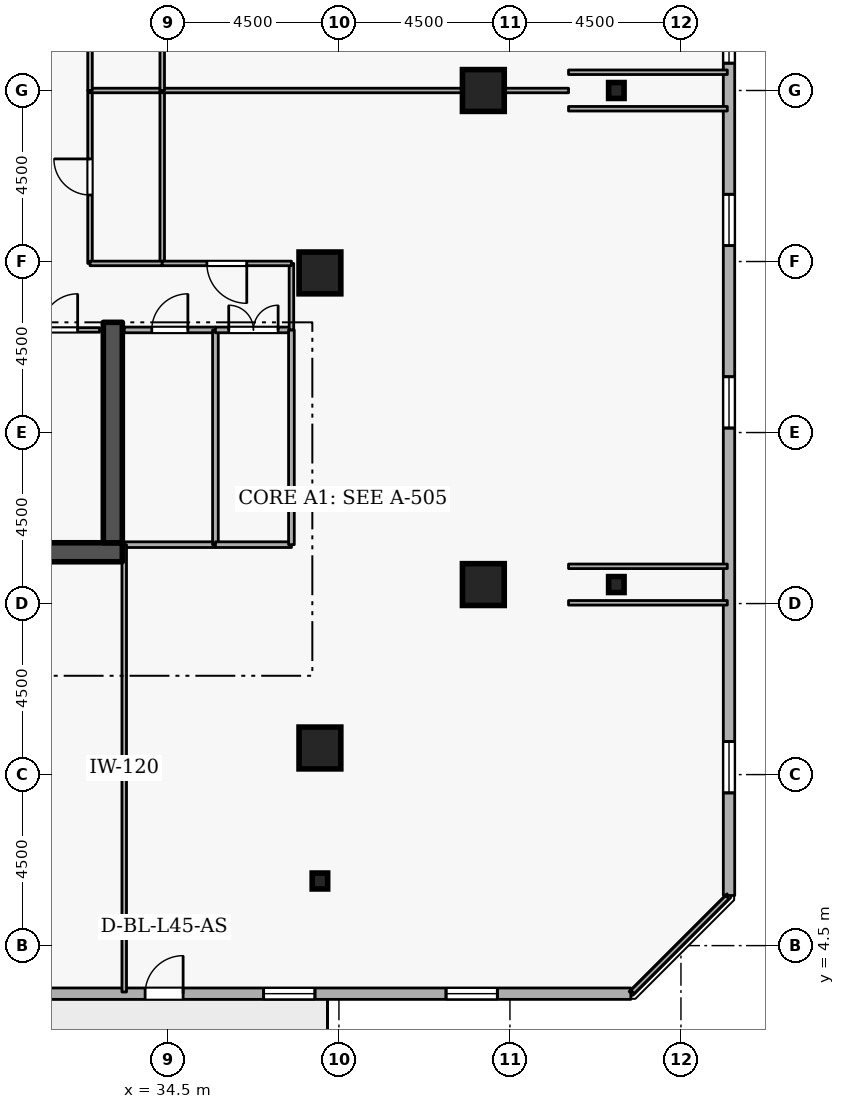
"""IFC4 building model, lengths in metres.
Left out: names, types, materials, properties, quantities, classifications, styles, units other than length and angle.
Written with IfcOpenShell. Run it as: python <this file> out.ifc"""

import sys

from ifc_helpers import new_model, si_unit, direction, frame, frame_2d, origin, origin_2d, place, context, subcontext, project, spatial, rectangle, i_section, extrude, element, fill, save


model = new_model("IFC4")
c1 = context("Model", 3, precision=1e-05, world=origin(), true_north=direction((0.0, 1.0)))
c2 = subcontext(c1, "Body", "Model", "MODEL_VIEW")
j1 = project(units=[si_unit("LENGTHUNIT", "METRE"), si_unit("PLANEANGLEUNIT", "RADIAN")], contexts=[c1])
p1 = place(None, origin())
s1 = spatial("IfcSite", under=j1, at=p1, CompositionType="ELEMENT")
p2 = place(p1, origin())
s2 = spatial("IfcBuilding", under=s1, at=p2, CompositionType="ELEMENT")
p3 = place(p2, frame((0.0, 0.0, 170.7)))
s3 = spatial("IfcBuildingStorey", under=s2, at=p3, CompositionType="ELEMENT", Elevation=170.7)
p4 = place(p3, frame((17.7, 14.85, 0.0), z_axis=(0.0, 0.0, 1.0), x_axis=(1.0, 0.0, 0.0)))
e1 = element("IfcWall", 1, at=p4, inside=s3, PredefinedType="SHEAR", context=c2, shape_type="SweptSolid", body=[
    extrude(rectangle(XDim=15.6, YDim=0.5, at=frame_2d((7.8, 0.0))), origin(), (0.0, 0.0, 1.0), 3.6),
])
p5 = place(p3, frame((33.05, 15.1, 0.0), z_axis=(0.0, 0.0, 1.0), x_axis=(0.0, 1.0, 0.0)))
e2 = element("IfcWall", 2, at=p5, inside=s3, PredefinedType="SHEAR", context=c2, shape_type="SweptSolid", body=[
    extrude(rectangle(XDim=5.8, YDim=0.5, at=frame_2d((2.9, 0.0))), origin(), (0.0, 0.0, 1.0), 3.6),
])
for number, where, z_axis, x_axis in (
    (3, (38.5, 9.7, 0.0), (0.0, 0.0, 1.0), (1.0, 0.0, 0.0)),
    (4, (42.8, 14.0, 0.0), (0.0, 0.0, 1.0), (1.0, 0.0, 0.0)),
    (5, (42.8, 27.0, 0.0), (0.0, 0.0, 1.0), (1.0, 0.0, 0.0)),
    (6, (38.5, 22.2, 0.0), (0.0, 0.0, 1.0), (1.0, 0.0, 0.0)),
):
    element("IfcColumn", number, at=place(p3, frame(where, z_axis=z_axis, x_axis=x_axis)), inside=s3, PredefinedType="COLUMN", context=c2, shape_type="SweptSolid", body=[
        extrude(rectangle(XDim=1.1, YDim=1.1, at=origin_2d()), origin(), (0.0, 0.0, 1.0), 3.6),
    ])
for number, where, z_axis, x_axis in (
    (7, (38.5, 6.2, 0.0), (0.0, 0.0, 1.0), (1.0, 0.0, 0.0)),
    (8, (46.3, 14.0, 0.0), (0.0, 0.0, 1.0), (1.0, 0.0, 0.0)),
    (9, (46.3, 27.0, 0.0), (0.0, 0.0, 1.0), (1.0, 0.0, 0.0)),
):
    element("IfcColumn", number, at=place(p3, frame(where, z_axis=z_axis, x_axis=x_axis)), inside=s3, PredefinedType="COLUMN", context=c2, shape_type="SweptSolid", body=[
        extrude(i_section(OverallWidth=0.407, OverallDepth=0.419, WebThickness=0.031, FlangeThickness=0.049, FilletRadius=0.015, at=origin_2d()), origin(), (0.0, 0.0, 1.0), 3.6),
    ])
p6 = place(p3, frame((10.319, 3.235, 0.0), z_axis=(0.0, 0.0, 1.0), x_axis=(1.0, 0.0, 0.0)))
e10 = element("IfcWall", 10, at=p6, inside=s3, PredefinedType="STANDARD", context=c2, shape_type="SweptSolid", body=[
    extrude(rectangle(XDim=36.363, YDim=0.3, at=frame_2d((18.181, 0.0))), origin(), (0.0, 0.0, 1.0), 2.22),
])
p7 = place(p6, frame((23.581, 0.0, 0.0)))
e11 = element("IfcOpeningElement", 11, at=p7, cuts=e10, PredefinedType="OPENING", context=c2, shape_type="SweptSolid", body=[
    extrude(rectangle(XDim=1.0, YDim=2.08, at=frame_2d((0.5, 1.04))), frame((0.0, 0.16, 0.0), z_axis=(0.0, -1.0, 0.0), x_axis=(1.0, 0.0, 0.0)), (0.0, 0.0, 1.0), 0.32),
])
p8 = place(p6, frame((2.7, 0.0, 0.72)))
e12 = element("IfcOpeningElement", 12, at=p8, cuts=e10, PredefinedType="OPENING", context=c2, shape_type="SweptSolid", body=[
    extrude(rectangle(XDim=1.35, YDim=1.05, at=frame_2d((0.675, 0.525))), frame((0.0, 0.16, 0.0), z_axis=(0.0, -1.0, 0.0), x_axis=(1.0, 0.0, 0.0)), (0.0, 0.0, 1.0), 0.32),
])
p9 = place(p6, frame((7.5, 0.0, 0.72)))
e13 = element("IfcOpeningElement", 13, at=p9, cuts=e10, PredefinedType="OPENING", context=c2, shape_type="SweptSolid", body=[
    extrude(rectangle(XDim=1.35, YDim=1.05, at=frame_2d((0.675, 0.525))), frame((0.0, 0.16, 0.0), z_axis=(0.0, -1.0, 0.0), x_axis=(1.0, 0.0, 0.0)), (0.0, 0.0, 1.0), 0.32),
])
p10 = place(p6, frame((12.3, 0.0, 0.72)))
e14 = element("IfcOpeningElement", 14, at=p10, cuts=e10, PredefinedType="OPENING", context=c2, shape_type="SweptSolid", body=[
    extrude(rectangle(XDim=1.35, YDim=1.05, at=frame_2d((0.675, 0.525))), frame((0.0, 0.16, 0.0), z_axis=(0.0, -1.0, 0.0), x_axis=(1.0, 0.0, 0.0)), (0.0, 0.0, 1.0), 0.32),
])
p11 = place(p6, frame((17.1, 0.0, 0.72)))
e15 = element("IfcOpeningElement", 15, at=p11, cuts=e10, PredefinedType="OPENING", context=c2, shape_type="SweptSolid", body=[
    extrude(rectangle(XDim=1.35, YDim=1.05, at=frame_2d((0.675, 0.525))), frame((0.0, 0.16, 0.0), z_axis=(0.0, -1.0, 0.0), x_axis=(1.0, 0.0, 0.0)), (0.0, 0.0, 1.0), 0.32),
])
p12 = place(p6, frame((26.7, 0.0, 0.72)))
e16 = element("IfcOpeningElement", 16, at=p12, cuts=e10, PredefinedType="OPENING", context=c2, shape_type="SweptSolid", body=[
    extrude(rectangle(XDim=1.35, YDim=1.05, at=frame_2d((0.675, 0.525))), frame((0.0, 0.16, 0.0), z_axis=(0.0, -1.0, 0.0), x_axis=(1.0, 0.0, 0.0)), (0.0, 0.0, 1.0), 0.32),
])
p13 = place(p6, frame((31.5, 0.0, 0.72)))
e17 = element("IfcOpeningElement", 17, at=p13, cuts=e10, PredefinedType="OPENING", context=c2, shape_type="SweptSolid", body=[
    extrude(rectangle(XDim=1.35, YDim=1.05, at=frame_2d((0.675, 0.525))), frame((0.0, 0.16, 0.0), z_axis=(0.0, -1.0, 0.0), x_axis=(1.0, 0.0, 0.0)), (0.0, 0.0, 1.0), 0.32),
])
p14 = place(p3, frame((49.265, 5.819, 0.0), z_axis=(0.0, 0.0, 1.0), x_axis=(0.0, 1.0, 0.0)))
e18 = element("IfcWall", 18, at=p14, inside=s3, PredefinedType="STANDARD", context=c2, shape_type="SweptSolid", body=[
    extrude(rectangle(XDim=36.363, YDim=0.3, at=frame_2d((18.181, 0.0))), origin(), (0.0, 0.0, 1.0), 2.22),
])
p15 = place(p14, frame((2.7, 0.0, 0.72)))
e19 = element("IfcOpeningElement", 19, at=p15, cuts=e18, PredefinedType="OPENING", context=c2, shape_type="SweptSolid", body=[
    extrude(rectangle(XDim=1.35, YDim=1.05, at=frame_2d((0.675, 0.525))), frame((0.0, 0.16, 0.0), z_axis=(0.0, -1.0, 0.0), x_axis=(1.0, 0.0, 0.0)), (0.0, 0.0, 1.0), 0.32),
])
p16 = place(p14, frame((12.3, 0.0, 0.72)))
e20 = element("IfcOpeningElement", 20, at=p16, cuts=e18, PredefinedType="OPENING", context=c2, shape_type="SweptSolid", body=[
    extrude(rectangle(XDim=1.35, YDim=1.05, at=frame_2d((0.675, 0.525))), frame((0.0, 0.16, 0.0), z_axis=(0.0, -1.0, 0.0), x_axis=(1.0, 0.0, 0.0)), (0.0, 0.0, 1.0), 0.32),
])
p17 = place(p14, frame((17.1, 0.0, 0.72)))
e21 = element("IfcOpeningElement", 21, at=p17, cuts=e18, PredefinedType="OPENING", context=c2, shape_type="SweptSolid", body=[
    extrude(rectangle(XDim=1.35, YDim=1.05, at=frame_2d((0.675, 0.525))), frame((0.0, 0.16, 0.0), z_axis=(0.0, -1.0, 0.0), x_axis=(1.0, 0.0, 0.0)), (0.0, 0.0, 1.0), 0.32),
])
p18 = place(p14, frame((21.9, 0.0, 0.72)))
e22 = element("IfcOpeningElement", 22, at=p18, cuts=e18, PredefinedType="OPENING", context=c2, shape_type="SweptSolid", body=[
    extrude(rectangle(XDim=1.35, YDim=1.05, at=frame_2d((0.675, 0.525))), frame((0.0, 0.16, 0.0), z_axis=(0.0, -1.0, 0.0), x_axis=(1.0, 0.0, 0.0)), (0.0, 0.0, 1.0), 0.32),
])
p19 = place(p14, frame((26.7, 0.0, 0.72)))
e23 = element("IfcOpeningElement", 23, at=p19, cuts=e18, PredefinedType="OPENING", context=c2, shape_type="SweptSolid", body=[
    extrude(rectangle(XDim=1.35, YDim=1.05, at=frame_2d((0.675, 0.525))), frame((0.0, 0.16, 0.0), z_axis=(0.0, -1.0, 0.0), x_axis=(1.0, 0.0, 0.0)), (0.0, 0.0, 1.0), 0.32),
])
p20 = place(p14, frame((31.5, 0.0, 0.72)))
e24 = element("IfcOpeningElement", 24, at=p20, cuts=e18, PredefinedType="OPENING", context=c2, shape_type="SweptSolid", body=[
    extrude(rectangle(XDim=1.35, YDim=1.05, at=frame_2d((0.675, 0.525))), frame((0.0, 0.16, 0.0), z_axis=(0.0, -1.0, 0.0), x_axis=(1.0, 0.0, 0.0)), (0.0, 0.0, 1.0), 0.32),
])
p21 = place(p3, frame((30.6, 20.7, 0.0), z_axis=(0.0, 0.0, 1.0), x_axis=(1.0, 0.0, 0.0)))
e25 = element("IfcWall", 25, at=p21, inside=s3, PredefinedType="PARTITIONING", context=c2, shape_type="SweptSolid", body=[
    extrude(rectangle(XDim=2.1, YDim=0.12, at=frame_2d((1.05, 0.0))), origin(), (0.0, 0.0, 1.0), 3.26),
])
p22 = place(p21, frame((0.575, 0.0, 0.0)))
e26 = element("IfcOpeningElement", 26, at=p22, cuts=e25, PredefinedType="OPENING", context=c2, shape_type="SweptSolid", body=[
    extrude(rectangle(XDim=0.95, YDim=2.1, at=frame_2d((0.475, 1.05))), frame((0.0, 0.07, 0.0), z_axis=(0.0, -1.0, 0.0), x_axis=(1.0, 0.0, 0.0)), (0.0, 0.0, 1.0), 0.14),
])
p23 = place(p3, frame((35.75, 15.05, 0.0), z_axis=(0.0, 0.0, 1.0), x_axis=(-1.0, 0.0, 0.0)))
e27 = element("IfcWall", 27, at=p23, inside=s3, PredefinedType="PARTITIONING", context=c2, shape_type="SweptSolid", body=[
    extrude(rectangle(XDim=2.4, YDim=0.15, at=frame_2d((1.2, 0.0))), origin(), (0.0, 0.0, 1.0), 3.26),
])
p24 = place(p3, frame((33.35, 20.7, 0.0), z_axis=(0.0, 0.0, 1.0), x_axis=(1.0, 0.0, 0.0)))
e28 = element("IfcWall", 28, at=p24, inside=s3, PredefinedType="PARTITIONING", context=c2, shape_type="SweptSolid", body=[
    extrude(rectangle(XDim=2.4, YDim=0.15, at=frame_2d((1.2, 0.0))), origin(), (0.0, 0.0, 1.0), 3.26),
])
p25 = place(p24, frame((0.725, 0.0, 0.0)))
e29 = element("IfcOpeningElement", 29, at=p25, cuts=e28, PredefinedType="OPENING", context=c2, shape_type="SweptSolid", body=[
    extrude(rectangle(XDim=0.95, YDim=2.1, at=frame_2d((0.475, 1.05))), frame((0.0, 0.085, 0.0), z_axis=(0.0, -1.0, 0.0), x_axis=(1.0, 0.0, 0.0)), (0.0, 0.0, 1.0), 0.17),
])
p26 = place(p3, frame((35.75, 20.7, 0.0), z_axis=(0.0, 0.0, 1.0), x_axis=(0.0, -1.0, 0.0)))
e30 = element("IfcWall", 30, at=p26, inside=s3, PredefinedType="PARTITIONING", context=c2, shape_type="SweptSolid", body=[
    extrude(rectangle(XDim=5.65, YDim=0.15, at=frame_2d((2.825, 0.0))), origin(), (0.0, 0.0, 1.0), 3.26),
])
p27 = place(p3, frame((37.75, 15.05, 0.0), z_axis=(0.0, 0.0, 1.0), x_axis=(-1.0, 0.0, 0.0)))
e31 = element("IfcWall", 31, at=p27, inside=s3, PredefinedType="PARTITIONING", context=c2, shape_type="SweptSolid", body=[
    extrude(rectangle(XDim=2.0, YDim=0.15, at=frame_2d((1.0, 0.0))), origin(), (0.0, 0.0, 1.0), 3.26),
])
p28 = place(p3, frame((35.75, 20.7, 0.0), z_axis=(0.0, 0.0, 1.0), x_axis=(1.0, 0.0, 0.0)))
e32 = element("IfcWall", 32, at=p28, inside=s3, PredefinedType="PARTITIONING", context=c2, shape_type="SweptSolid", body=[
    extrude(rectangle(XDim=2.0, YDim=0.15, at=frame_2d((1.0, 0.0))), origin(), (0.0, 0.0, 1.0), 3.26),
])
p29 = place(p28, frame((0.35, 0.0, 0.0)))
e33 = element("IfcOpeningElement", 33, at=p29, cuts=e32, PredefinedType="OPENING", context=c2, shape_type="SweptSolid", body=[
    extrude(rectangle(XDim=1.3, YDim=2.12, at=frame_2d((0.65, 1.06))), frame((0.0, 0.085, 0.0), z_axis=(0.0, -1.0, 0.0), x_axis=(1.0, 0.0, 0.0)), (0.0, 0.0, 1.0), 0.17),
])
p30 = place(p3, frame((37.75, 20.7, 0.0), z_axis=(0.0, 0.0, 1.0), x_axis=(0.0, -1.0, 0.0)))
e34 = element("IfcWall", 34, at=p30, inside=s3, PredefinedType="PARTITIONING", context=c2, shape_type="SweptSolid", body=[
    extrude(rectangle(XDim=5.65, YDim=0.15, at=frame_2d((2.825, 0.0))), origin(), (0.0, 0.0, 1.0), 3.26),
])
p31 = place(p3, frame((32.45, 22.45, 0.0), z_axis=(0.0, 0.0, 1.0), x_axis=(0.0, 1.0, 0.0)))
e35 = element("IfcWall", 35, at=p31, inside=s3, PredefinedType="PARTITIONING", context=c2, shape_type="SweptSolid", body=[
    extrude(rectangle(XDim=4.55, YDim=0.12, at=frame_2d((2.275, 0.0))), origin(), (0.0, 0.0, 1.0), 3.26),
])
p32 = place(p31, frame((1.8, 0.0, 0.0)))
e36 = element("IfcOpeningElement", 36, at=p32, cuts=e35, PredefinedType="OPENING", context=c2, shape_type="SweptSolid", body=[
    extrude(rectangle(XDim=0.95, YDim=2.1, at=frame_2d((0.475, 1.05))), frame((0.0, 0.07, 0.0), z_axis=(0.0, -1.0, 0.0), x_axis=(1.0, 0.0, 0.0)), (0.0, 0.0, 1.0), 0.14),
])
p33 = place(p3, frame((32.45, 27.0, 0.0), z_axis=(0.0, 0.0, 1.0), x_axis=(1.0, 0.0, 0.0)))
e37 = element("IfcWall", 37, at=p33, inside=s3, PredefinedType="PARTITIONING", context=c2, shape_type="SweptSolid", body=[
    extrude(rectangle(XDim=1.9, YDim=0.12, at=frame_2d((0.95, 0.0))), origin(), (0.0, 0.0, 1.0), 1.785),
])
p34 = place(p3, frame((34.35, 27.0, 0.0), z_axis=(0.0, 0.0, 1.0), x_axis=(0.0, -1.0, 0.0)))
e38 = element("IfcWall", 38, at=p34, inside=s3, PredefinedType="PARTITIONING", context=c2, shape_type="SweptSolid", body=[
    extrude(rectangle(XDim=4.55, YDim=0.12, at=frame_2d((2.275, 0.0))), origin(), (0.0, 0.0, 1.0), 3.26),
])
p35 = place(p3, frame((34.35, 22.45, 0.0), z_axis=(0.0, 0.0, 1.0), x_axis=(-1.0, 0.0, 0.0)))
e39 = element("IfcWall", 39, at=p35, inside=s3, PredefinedType="PARTITIONING", context=c2, shape_type="SweptSolid", body=[
    extrude(rectangle(XDim=1.9, YDim=0.12, at=frame_2d((0.95, 0.0))), origin(), (0.0, 0.0, 1.0), 3.26),
])
p36 = place(p3, frame((33.35, 3.28, 0.0), z_axis=(0.0, 0.0, 1.0), x_axis=(0.0, 1.0, 0.0)))
e40 = element("IfcWall", 40, at=p36, inside=s3, PredefinedType="PARTITIONING", context=c2, shape_type="SweptSolid", body=[
    extrude(rectangle(XDim=11.77, YDim=0.12, at=frame_2d((5.885, 0.0))), origin(), (0.0, 0.0, 1.0), 2.465),
])
p37 = place(p3, frame((37.75, 20.7, 0.0), z_axis=(0.0, 0.0, 1.0), x_axis=(0.0, 1.0, 0.0)))
e41 = element("IfcWall", 41, at=p37, inside=s3, PredefinedType="PARTITIONING", context=c2, shape_type="SweptSolid", body=[
    extrude(rectangle(XDim=1.75, YDim=0.12, at=frame_2d((0.875, 0.0))), origin(), (0.0, 0.0, 1.0), 3.26),
])
p38 = place(p3, frame((37.75, 22.45, 0.0), z_axis=(0.0, 0.0, 1.0), x_axis=(-1.0, 0.0, 0.0)))
e42 = element("IfcWall", 42, at=p38, inside=s3, PredefinedType="PARTITIONING", context=c2, shape_type="SweptSolid", body=[
    extrude(rectangle(XDim=3.4, YDim=0.12, at=frame_2d((1.7, 0.0))), origin(), (0.0, 0.0, 1.0), 3.26),
])
p39 = place(p38, frame((1.175, 0.0, 0.0)))
e43 = element("IfcOpeningElement", 43, at=p39, cuts=e42, PredefinedType="OPENING", context=c2, shape_type="SweptSolid", body=[
    extrude(rectangle(XDim=1.05, YDim=2.1, at=frame_2d((0.525, 1.05))), frame((0.0, 0.07, 0.0), z_axis=(0.0, -1.0, 0.0), x_axis=(1.0, 0.0, 0.0)), (0.0, 0.0, 1.0), 0.14),
])
p40 = place(p3, frame((34.35, 27.0, 0.0), z_axis=(0.0, 0.0, 1.0), x_axis=(1.0, 0.0, 0.0)))
e44 = element("IfcWall", 44, at=p40, inside=s3, PredefinedType="PARTITIONING", context=c2, shape_type="SweptSolid", body=[
    extrude(rectangle(XDim=10.692, YDim=0.12, at=frame_2d((5.346, 0.0))), origin(), (0.0, 0.0, 1.0), 1.785),
])
for number, where, z_axis, x_axis in (
    (45, (45.042, 26.52, 0.0), (0.0, 0.0, 1.0), (1.0, 0.0, 0.0)),
    (46, (49.22, 14.48, 0.0), (0.0, 0.0, 1.0), (-1.0, 0.0, 0.0)),
    (47, (45.042, 13.52, 0.0), (0.0, 0.0, 1.0), (1.0, 0.0, 0.0)),
):
    element("IfcWall", number, at=place(p3, frame(where, z_axis=z_axis, x_axis=x_axis)), inside=s3, PredefinedType="PARTITIONING", context=c2, shape_type="SweptSolid", body=[
        extrude(rectangle(XDim=4.178, YDim=0.12, at=frame_2d((2.089, 0.0))), origin(), (0.0, 0.0, 1.0), 1.785),
    ])
p41 = place(p3, frame((49.22, 5.775, 0.0), z_axis=(0.0, 0.0, 1.0), x_axis=(-0.707106781187, -0.707106781187, 0.0)))
e48 = element("IfcWall", 48, at=p41, inside=s3, PredefinedType="PARTITIONING", context=c2, shape_type="SweptSolid", body=[
    extrude(rectangle(XDim=3.528, YDim=0.12, at=frame_2d((1.764, 0.0))), origin(), (0.0, 0.0, 1.0), 3.26),
])
p42 = place(p3, frame((32.45, 27.0, 0.0), z_axis=(0.0, 0.0, 1.0), x_axis=(0.0, 1.0, 0.0)))
e49 = element("IfcWall", 49, at=p42, inside=s3, PredefinedType="PARTITIONING", context=c2, shape_type="SweptSolid", body=[
    extrude(rectangle(XDim=4.55, YDim=0.12, at=frame_2d((2.275, 0.0))), origin(), (0.0, 0.0, 1.0), 3.26),
])
p43 = place(p42, frame((1.8, 0.0, 0.0)))
e50 = element("IfcOpeningElement", 50, at=p43, cuts=e49, PredefinedType="OPENING", context=c2, shape_type="SweptSolid", body=[
    extrude(rectangle(XDim=0.95, YDim=2.1, at=frame_2d((0.475, 1.05))), frame((0.0, 0.07, 0.0), z_axis=(0.0, -1.0, 0.0), x_axis=(1.0, 0.0, 0.0)), (0.0, 0.0, 1.0), 0.14),
])
p44 = place(p3, frame((34.35, 31.55, 0.0), z_axis=(0.0, 0.0, 1.0), x_axis=(0.0, -1.0, 0.0)))
e51 = element("IfcWall", 51, at=p44, inside=s3, PredefinedType="PARTITIONING", context=c2, shape_type="SweptSolid", body=[
    extrude(rectangle(XDim=4.55, YDim=0.12, at=frame_2d((2.275, 0.0))), origin(), (0.0, 0.0, 1.0), 3.26),
])
p45 = place(p3, frame((49.22, 27.48, 0.0), z_axis=(0.0, 0.0, 1.0), x_axis=(-1.0, 0.0, 0.0)))
e52 = element("IfcWall", 52, at=p45, inside=s3, PredefinedType="PARTITIONING", context=c2, shape_type="SweptSolid", body=[
    extrude(rectangle(XDim=4.178, YDim=0.12, at=frame_2d((2.089, 0.0))), origin(), (0.0, 0.0, 1.0), 1.785),
])
p46 = place(p7, origin())
e53 = element("IfcDoor", 53, at=p46, inside=s3, OperationType="SINGLE_SWING_RIGHT", PredefinedType="DOOR", context=c2, shape_type="SweptSolid", body=[
    extrude(rectangle(XDim=1.0, YDim=2.08, at=frame_2d((0.5, 1.04))), frame((0.0, 0.025, 0.0), z_axis=(0.0, -1.0, 0.0), x_axis=(1.0, 0.0, 0.0)), (0.0, 0.0, 1.0), 0.05),
])
fill(e11, e53)
p47 = place(p12, origin())
e54 = element("IfcWindow", 54, at=p47, inside=s3, PartitioningType="SINGLE_PANEL", PredefinedType="WINDOW", context=c2, shape_type="SweptSolid", body=[
    extrude(rectangle(XDim=1.35, YDim=1.05, at=frame_2d((0.675, 0.525))), frame((0.0, 0.03, 0.0), z_axis=(0.0, -1.0, 0.0), x_axis=(1.0, 0.0, 0.0)), (0.0, 0.0, 1.0), 0.06),
])
fill(e16, e54)
p48 = place(p13, origin())
e55 = element("IfcWindow", 55, at=p48, inside=s3, PartitioningType="SINGLE_PANEL", PredefinedType="WINDOW", context=c2, shape_type="SweptSolid", body=[
    extrude(rectangle(XDim=1.35, YDim=1.05, at=frame_2d((0.675, 0.525))), frame((0.0, 0.03, 0.0), z_axis=(0.0, -1.0, 0.0), x_axis=(1.0, 0.0, 0.0)), (0.0, 0.0, 1.0), 0.06),
])
fill(e17, e55)
p49 = place(p15, origin())
e56 = element("IfcWindow", 56, at=p49, inside=s3, PartitioningType="SINGLE_PANEL", PredefinedType="WINDOW", context=c2, shape_type="SweptSolid", body=[
    extrude(rectangle(XDim=1.35, YDim=1.05, at=frame_2d((0.675, 0.525))), frame((0.0, 0.03, 0.0), z_axis=(0.0, -1.0, 0.0), x_axis=(1.0, 0.0, 0.0)), (0.0, 0.0, 1.0), 0.06),
])
fill(e19, e56)
p50 = place(p16, origin())
e57 = element("IfcWindow", 57, at=p50, inside=s3, PartitioningType="SINGLE_PANEL", PredefinedType="WINDOW", context=c2, shape_type="SweptSolid", body=[
    extrude(rectangle(XDim=1.35, YDim=1.05, at=frame_2d((0.675, 0.525))), frame((0.0, 0.03, 0.0), z_axis=(0.0, -1.0, 0.0), x_axis=(1.0, 0.0, 0.0)), (0.0, 0.0, 1.0), 0.06),
])
fill(e20, e57)
p51 = place(p17, origin())
e58 = element("IfcWindow", 58, at=p51, inside=s3, PartitioningType="SINGLE_PANEL", PredefinedType="WINDOW", context=c2, shape_type="SweptSolid", body=[
    extrude(rectangle(XDim=1.35, YDim=1.05, at=frame_2d((0.675, 0.525))), frame((0.0, 0.03, 0.0), z_axis=(0.0, -1.0, 0.0), x_axis=(1.0, 0.0, 0.0)), (0.0, 0.0, 1.0), 0.06),
])
fill(e21, e58)
p52 = place(p18, origin())
e59 = element("IfcWindow", 59, at=p52, inside=s3, PartitioningType="SINGLE_PANEL", PredefinedType="WINDOW", context=c2, shape_type="SweptSolid", body=[
    extrude(rectangle(XDim=1.35, YDim=1.05, at=frame_2d((0.675, 0.525))), frame((0.0, 0.03, 0.0), z_axis=(0.0, -1.0, 0.0), x_axis=(1.0, 0.0, 0.0)), (0.0, 0.0, 1.0), 0.06),
])
fill(e22, e59)
p53 = place(p22, origin())
e60 = element("IfcDoor", 60, at=p53, inside=s3, OperationType="SINGLE_SWING_RIGHT", PredefinedType="DOOR", context=c2, shape_type="SweptSolid", body=[
    extrude(rectangle(XDim=0.95, YDim=2.1, at=frame_2d((0.475, 1.05))), frame((0.0, 0.025, 0.0), z_axis=(0.0, -1.0, 0.0), x_axis=(1.0, 0.0, 0.0)), (0.0, 0.0, 1.0), 0.05),
])
fill(e26, e60)
p54 = place(p25, origin())
e61 = element("IfcDoor", 61, at=p54, inside=s3, OperationType="SINGLE_SWING_RIGHT", PredefinedType="DOOR", context=c2, shape_type="SweptSolid", body=[
    extrude(rectangle(XDim=0.95, YDim=2.1, at=frame_2d((0.475, 1.05))), frame((0.0, 0.025, 0.0), z_axis=(0.0, -1.0, 0.0), x_axis=(1.0, 0.0, 0.0)), (0.0, 0.0, 1.0), 0.05),
])
fill(e29, e61)
p55 = place(p29, origin())
e62 = element("IfcDoor", 62, at=p55, inside=s3, OperationType="DOUBLE_DOOR_SINGLE_SWING", PredefinedType="DOOR", context=c2, shape_type="SweptSolid", body=[
    extrude(rectangle(XDim=1.3, YDim=2.12, at=frame_2d((0.65, 1.06))), frame((0.0, 0.025, 0.0), z_axis=(0.0, -1.0, 0.0), x_axis=(1.0, 0.0, 0.0)), (0.0, 0.0, 1.0), 0.05),
])
fill(e33, e62)
p56 = place(p32, origin())
e63 = element("IfcDoor", 63, at=p56, inside=s3, OperationType="SINGLE_SWING_RIGHT", PredefinedType="DOOR", context=c2, shape_type="SweptSolid", body=[
    extrude(rectangle(XDim=0.95, YDim=2.1, at=frame_2d((0.475, 1.05))), frame((0.0, 0.025, 0.0), z_axis=(0.0, -1.0, 0.0), x_axis=(1.0, 0.0, 0.0)), (0.0, 0.0, 1.0), 0.05),
])
fill(e36, e63)
p57 = place(p39, origin())
e64 = element("IfcDoor", 64, at=p57, inside=s3, OperationType="SINGLE_SWING_LEFT", PredefinedType="DOOR", context=c2, shape_type="SweptSolid", body=[
    extrude(rectangle(XDim=1.05, YDim=2.1, at=frame_2d((0.525, 1.05))), frame((0.0, 0.025, 0.0), z_axis=(0.0, -1.0, 0.0), x_axis=(1.0, 0.0, 0.0)), (0.0, 0.0, 1.0), 0.05),
])
fill(e43, e64)
save(model, sys.argv[1])
